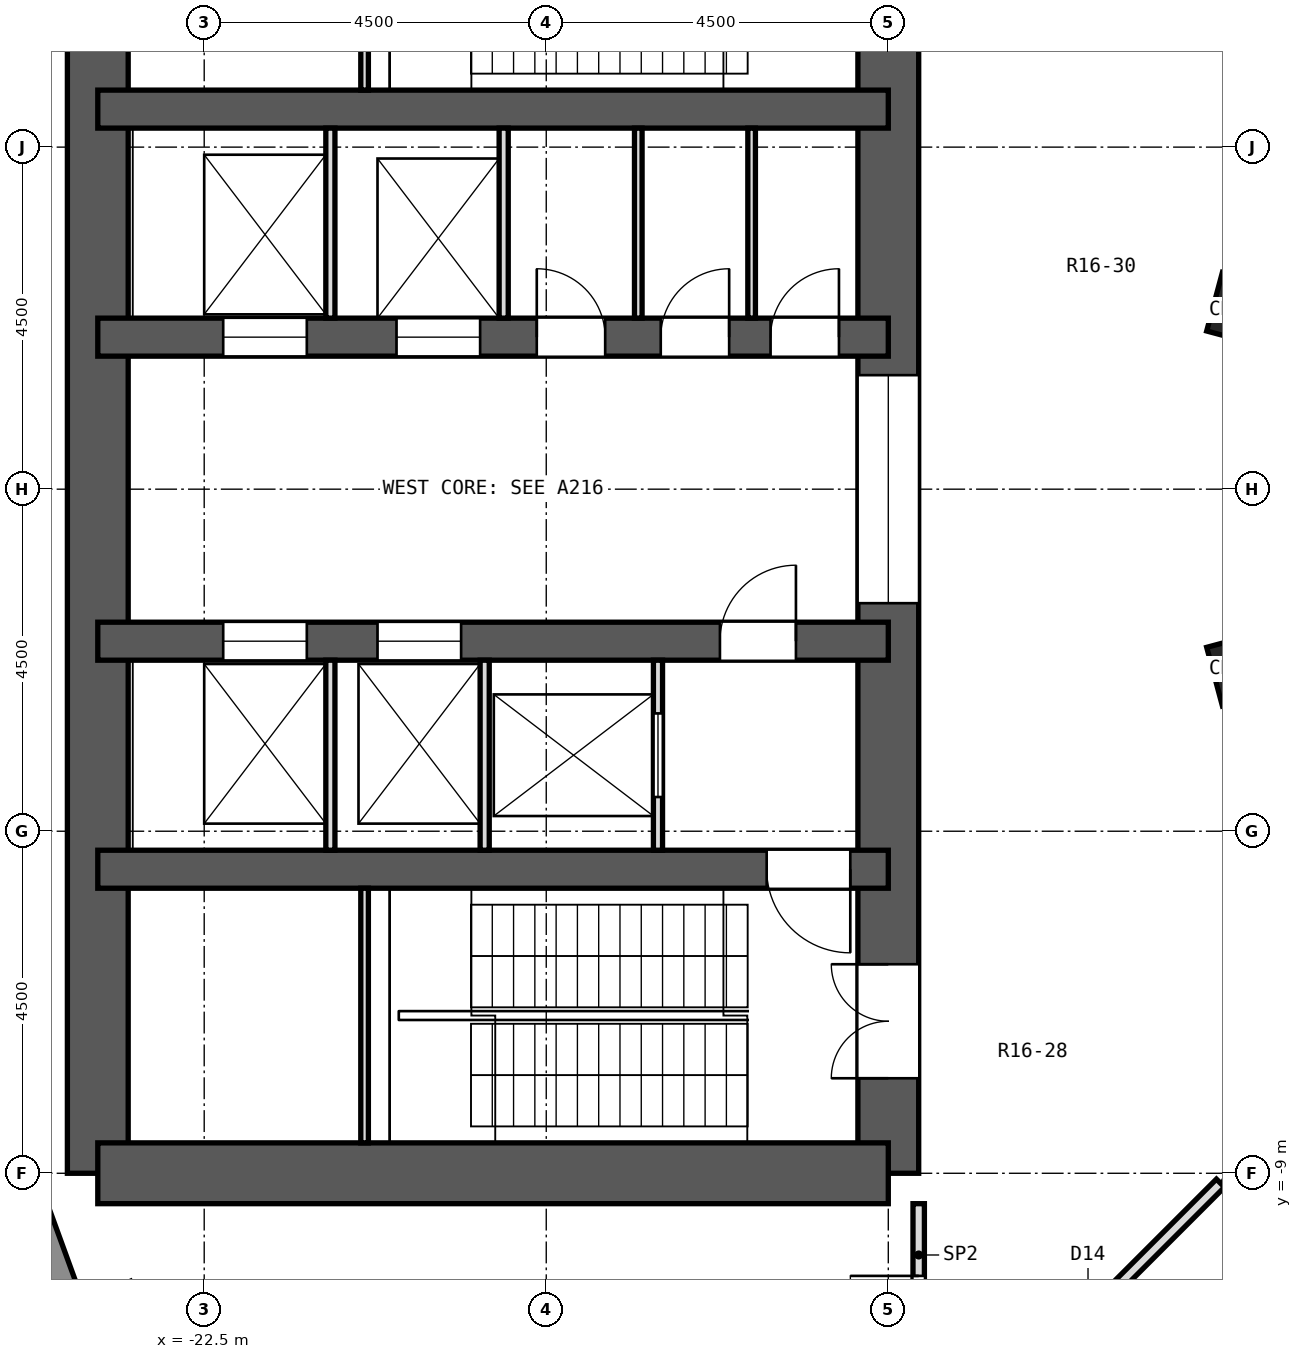
"""IFC4 building model, lengths in metres.
Left out: names, types, materials, properties, quantities, classifications, styles, units other than length and angle.
Written with IfcOpenShell. Run it as: python <this file> out.ifc"""

import sys

from ifc_helpers import new_model, si_unit, direction, frame, frame_2d, origin, origin_2d, place, context, subcontext, project, spatial, rectangle, extrude, element, fill, save


model = new_model("IFC4")
c1 = context("Model", 3, precision=1e-05, world=origin(), true_north=direction((0.0, 1.0)))
c2 = subcontext(c1, "Body", "Model", "MODEL_VIEW")
j1 = project(units=[si_unit("LENGTHUNIT", "METRE"), si_unit("PLANEANGLEUNIT", "RADIAN")], contexts=[c1])
p1 = place(None, origin())
s1 = spatial("IfcSite", under=j1, at=p1, CompositionType="ELEMENT")
p2 = place(p1, origin())
s2 = spatial("IfcBuilding", under=s1, at=p2, CompositionType="ELEMENT")
p3 = place(p2, frame((0.0, 0.0, 86.9)))
s3 = spatial("IfcBuildingStorey", under=s2, at=p3, CompositionType="ELEMENT", Elevation=86.9)
for number, where, z_axis, x_axis in (
    (1, (-8.821, 2.364, 0.0), (0.0, 0.0, 1.0), (-0.966, 0.259, 0.0)),
    (2, (-8.821, -2.364, 0.0), (0.0, 0.0, 1.0), (-0.966, -0.259, 0.0)),
):
    element("IfcColumn", number, at=place(p3, frame(where, z_axis=z_axis, x_axis=x_axis)), inside=s3, PredefinedType="COLUMN", context=c2, shape_type="SweptSolid", body=[
        extrude(rectangle(XDim=0.8, YDim=0.8, at=origin_2d()), origin(), (0.0, 0.0, 1.0), 5.0),
    ])
p4 = place(p3, frame((-13.5, -9.0, 0.0), z_axis=(0.0, 0.0, 1.0), x_axis=(0.0, 1.0, 0.0)))
e3 = element("IfcWall", 3, at=p4, inside=s3, PredefinedType="SHEAR", context=c2, shape_type="SweptSolid", body=[
    extrude(rectangle(XDim=18.0, YDim=0.8, at=frame_2d((9.0, 0.0))), origin(), (0.0, 0.0, 1.0), 5.0),
])
p5 = place(p4, frame((15.25, 0.0, 0.0)))
e4 = element("IfcOpeningElement", 4, at=p5, cuts=e3, PredefinedType="OPENING", context=c2, shape_type="SweptSolid", body=[
    extrude(rectangle(XDim=1.5, YDim=2.1, at=frame_2d((0.75, 1.05))), frame((0.0, 0.412, 0.0), z_axis=(0.0, -1.0, 0.0), x_axis=(1.0, 0.0, 0.0)), (0.0, 0.0, 1.0), 0.824),
])
p6 = place(p4, frame((1.25, 0.0, 0.0)))
e5 = element("IfcOpeningElement", 5, at=p6, cuts=e3, PredefinedType="OPENING", context=c2, shape_type="SweptSolid", body=[
    extrude(rectangle(XDim=1.5, YDim=2.1, at=frame_2d((0.75, 1.05))), frame((0.0, 0.412, 0.0), z_axis=(0.0, -1.0, 0.0), x_axis=(1.0, 0.0, 0.0)), (0.0, 0.0, 1.0), 0.824),
])
p7 = place(p4, frame((7.5, 0.0, 0.0)))
e6 = element("IfcOpeningElement", 6, at=p7, cuts=e3, PredefinedType="OPENING", context=c2, shape_type="SweptSolid", body=[
    extrude(rectangle(XDim=3.0, YDim=2.4, at=frame_2d((1.5, 1.2))), frame((0.0, 0.412, 0.0), z_axis=(0.0, -1.0, 0.0), x_axis=(1.0, 0.0, 0.0)), (0.0, 0.0, 1.0), 0.824),
])
p8 = place(p3, frame((-23.9, -9.0, 0.0), z_axis=(0.0, 0.0, 1.0), x_axis=(0.0, 1.0, 0.0)))
e7 = element("IfcWall", 7, at=p8, inside=s3, PredefinedType="SHEAR", context=c2, shape_type="SweptSolid", body=[
    extrude(rectangle(XDim=18.0, YDim=0.8, at=frame_2d((9.0, 0.0))), origin(), (0.0, 0.0, 1.0), 5.0),
])
p9 = place(p3, frame((-13.5, -9.0, 0.0), z_axis=(0.0, 0.0, 1.0), x_axis=(-1.0, 0.0, 0.0)))
e8 = element("IfcWall", 8, at=p9, inside=s3, PredefinedType="SHEAR", context=c2, shape_type="SweptSolid", body=[
    extrude(rectangle(XDim=10.4, YDim=0.8, at=frame_2d((5.2, 0.0))), origin(), (0.0, 0.0, 1.0), 5.0),
])
p10 = place(p3, frame((-13.5, 5.0, 0.0), z_axis=(0.0, 0.0, 1.0), x_axis=(-1.0, 0.0, 0.0)))
e9 = element("IfcWall", 9, at=p10, inside=s3, PredefinedType="SHEAR", context=c2, shape_type="SweptSolid", body=[
    extrude(rectangle(XDim=10.4, YDim=0.5, at=frame_2d((5.2, 0.0))), origin(), (0.0, 0.0, 1.0), 5.0),
])
p11 = place(p3, frame((-13.5, -5.0, 0.0), z_axis=(0.0, 0.0, 1.0), x_axis=(-1.0, 0.0, 0.0)))
e10 = element("IfcWall", 10, at=p11, inside=s3, PredefinedType="SHEAR", context=c2, shape_type="SweptSolid", body=[
    extrude(rectangle(XDim=10.4, YDim=0.5, at=frame_2d((5.2, 0.0))), origin(), (0.0, 0.0, 1.0), 5.0),
])
p12 = place(p11, frame((0.5, 0.0, 0.0)))
e11 = element("IfcOpeningElement", 11, at=p12, cuts=e10, PredefinedType="OPENING", context=c2, shape_type="SweptSolid", body=[
    extrude(rectangle(XDim=1.1, YDim=2.1, at=frame_2d((0.55, 1.05))), frame((0.0, 0.262, 0.0), z_axis=(0.0, -1.0, 0.0), x_axis=(1.0, 0.0, 0.0)), (0.0, 0.0, 1.0), 0.524),
])
p13 = place(p3, frame((-13.5, 2.0, 0.0), z_axis=(0.0, 0.0, 1.0), x_axis=(-1.0, 0.0, 0.0)))
e12 = element("IfcWall", 12, at=p13, inside=s3, PredefinedType="SHEAR", context=c2, shape_type="SweptSolid", body=[
    extrude(rectangle(XDim=10.4, YDim=0.5, at=frame_2d((5.2, 0.0))), origin(), (0.0, 0.0, 1.0), 5.0),
])
p14 = place(p13, frame((5.37, 0.0, 0.0)))
e13 = element("IfcOpeningElement", 13, at=p14, cuts=e12, PredefinedType="OPENING", context=c2, shape_type="SweptSolid", body=[
    extrude(rectangle(XDim=1.1, YDim=2.1, at=frame_2d((0.55, 1.05))), frame((0.0, 0.262, 0.0), z_axis=(0.0, -1.0, 0.0), x_axis=(1.0, 0.0, 0.0)), (0.0, 0.0, 1.0), 0.524),
])
p15 = place(p13, frame((7.65, 0.0, 0.0)))
e14 = element("IfcOpeningElement", 14, at=p15, cuts=e12, PredefinedType="OPENING", context=c2, shape_type="SweptSolid", body=[
    extrude(rectangle(XDim=1.1, YDim=2.1, at=frame_2d((0.55, 1.05))), frame((0.0, 0.262, 0.0), z_axis=(0.0, -1.0, 0.0), x_axis=(1.0, 0.0, 0.0)), (0.0, 0.0, 1.0), 0.524),
])
p16 = place(p13, frame((0.649, 0.0, 0.0)))
e15 = element("IfcOpeningElement", 15, at=p16, cuts=e12, PredefinedType="OPENING", context=c2, shape_type="SweptSolid", body=[
    extrude(rectangle(XDim=0.9, YDim=2.1, at=frame_2d((0.45, 1.05))), frame((0.0, 0.262, 0.0), z_axis=(0.0, -1.0, 0.0), x_axis=(1.0, 0.0, 0.0)), (0.0, 0.0, 1.0), 0.524),
])
p17 = place(p13, frame((2.094, 0.0, 0.0)))
e16 = element("IfcOpeningElement", 16, at=p17, cuts=e12, PredefinedType="OPENING", context=c2, shape_type="SweptSolid", body=[
    extrude(rectangle(XDim=0.9, YDim=2.1, at=frame_2d((0.45, 1.05))), frame((0.0, 0.262, 0.0), z_axis=(0.0, -1.0, 0.0), x_axis=(1.0, 0.0, 0.0)), (0.0, 0.0, 1.0), 0.524),
])
p18 = place(p13, frame((3.725, 0.0, 0.0)))
e17 = element("IfcOpeningElement", 17, at=p18, cuts=e12, PredefinedType="OPENING", context=c2, shape_type="SweptSolid", body=[
    extrude(rectangle(XDim=0.9, YDim=2.1, at=frame_2d((0.45, 1.05))), frame((0.0, 0.262, 0.0), z_axis=(0.0, -1.0, 0.0), x_axis=(1.0, 0.0, 0.0)), (0.0, 0.0, 1.0), 0.524),
])
p19 = place(p3, frame((-13.5, -2.0, 0.0), z_axis=(0.0, 0.0, 1.0), x_axis=(-1.0, 0.0, 0.0)))
e18 = element("IfcWall", 18, at=p19, inside=s3, PredefinedType="SHEAR", context=c2, shape_type="SweptSolid", body=[
    extrude(rectangle(XDim=10.4, YDim=0.5, at=frame_2d((5.2, 0.0))), origin(), (0.0, 0.0, 1.0), 5.0),
])
p20 = place(p19, frame((5.62, 0.0, 0.0)))
e19 = element("IfcOpeningElement", 19, at=p20, cuts=e18, PredefinedType="OPENING", context=c2, shape_type="SweptSolid", body=[
    extrude(rectangle(XDim=1.1, YDim=2.1, at=frame_2d((0.55, 1.05))), frame((0.0, 0.262, 0.0), z_axis=(0.0, -1.0, 0.0), x_axis=(1.0, 0.0, 0.0)), (0.0, 0.0, 1.0), 0.524),
])
p21 = place(p19, frame((7.65, 0.0, 0.0)))
e20 = element("IfcOpeningElement", 20, at=p21, cuts=e18, PredefinedType="OPENING", context=c2, shape_type="SweptSolid", body=[
    extrude(rectangle(XDim=1.1, YDim=2.1, at=frame_2d((0.55, 1.05))), frame((0.0, 0.262, 0.0), z_axis=(0.0, -1.0, 0.0), x_axis=(1.0, 0.0, 0.0)), (0.0, 0.0, 1.0), 0.524),
])
p22 = place(p19, frame((1.215, 0.0, 0.0)))
e21 = element("IfcOpeningElement", 21, at=p22, cuts=e18, PredefinedType="OPENING", context=c2, shape_type="SweptSolid", body=[
    extrude(rectangle(XDim=1.0, YDim=2.1, at=frame_2d((0.5, 1.05))), frame((0.0, 0.262, 0.0), z_axis=(0.0, -1.0, 0.0), x_axis=(1.0, 0.0, 0.0)), (0.0, 0.0, 1.0), 0.524),
])
p23 = place(p3, frame((-25.617, -7.383, 0.0), z_axis=(0.0, 0.0, 1.0), x_axis=(0.341990236633, -0.939703505393, 0.0)))
e22 = element("IfcWall", 22, at=p23, inside=s3, PredefinedType="SOLIDWALL", context=c2, shape_type="SweptSolid", body=[
    extrude(rectangle(XDim=3.648, YDim=0.6, at=frame_2d((1.824, 0.0))), origin(), (0.0, 0.0, 1.0), 4.5),
])
p24 = place(p3, frame((-9.077, -9.077, 0.0), z_axis=(0.0, 0.0, 1.0), x_axis=(0.865961614908, -0.500110469302, 0.0)))
e23 = element("IfcWall", 23, at=p24, inside=s3, PredefinedType="PARTITIONING", context=c2, shape_type="SweptSolid", body=[
    extrude(rectangle(XDim=6.645, YDim=0.15, at=frame_2d((3.322, 0.0))), origin(), (0.0, 0.0, 1.0), 4.5),
])
p25 = place(p24, frame((2.422, 0.0, 0.0)))
e24 = element("IfcOpeningElement", 24, at=p25, cuts=e23, PredefinedType="OPENING", context=c2, shape_type="SweptSolid", body=[
    extrude(rectangle(XDim=1.8, YDim=2.1, at=frame_2d((0.9, 1.05))), frame((0.0, 0.087, 0.0), z_axis=(0.0, -1.0, 0.0), x_axis=(1.0, 0.0, 0.0)), (0.0, 0.0, 1.0), 0.174),
])
p26 = place(p24, frame((5.184, 0.0, 0.0)))
e25 = element("IfcOpeningElement", 25, at=p26, cuts=e23, PredefinedType="OPENING", context=c2, shape_type="SweptSolid", body=[
    extrude(rectangle(XDim=0.9, YDim=2.1, at=frame_2d((0.45, 1.05))), frame((0.0, 0.087, 0.0), z_axis=(0.0, -1.0, 0.0), x_axis=(1.0, 0.0, 0.0)), (0.0, 0.0, 1.0), 0.174),
])
p27 = place(p3, frame((-13.065, -13.065, 0.0), z_axis=(0.0, 0.0, 1.0), x_axis=(0.707106781187, 0.707106781187, 0.0)))
e26 = element("IfcWall", 26, at=p27, inside=s3, PredefinedType="PARTITIONING", context=c2, shape_type="SweptSolid", body=[
    extrude(rectangle(XDim=5.565, YDim=0.15, at=frame_2d((2.782, 0.0))), origin(), (0.0, 0.0, 1.0), 4.5),
])
p28 = place(p27, frame((2.65, 0.0, 0.0)))
e27 = element("IfcOpeningElement", 27, at=p28, cuts=e26, PredefinedType="OPENING", context=c2, shape_type="SweptSolid", body=[
    extrude(rectangle(XDim=0.9, YDim=2.1, at=frame_2d((0.45, 1.05))), frame((0.0, 0.087, 0.0), z_axis=(0.0, -1.0, 0.0), x_axis=(1.0, 0.0, 0.0)), (0.0, 0.0, 1.0), 0.174),
])
p29 = place(p3, frame((-10.024, -14.763, 0.0), z_axis=(0.0, 0.0, 1.0), x_axis=(0.499864084004, 0.866103860702, 0.0)))
e28 = element("IfcWall", 28, at=p29, inside=s3, PredefinedType="PARTITIONING", context=c2, shape_type="SweptSolid", body=[
    extrude(rectangle(XDim=5.322, YDim=0.1, at=frame_2d((2.661, 0.0))), origin(), (0.0, 0.0, 1.0), 4.5),
])
p30 = place(p3, frame((-13.1, -13.025, 0.0), z_axis=(0.0, 0.0, 1.0), x_axis=(0.0, 1.0, 0.0)))
e29 = element("IfcWall", 29, at=p30, inside=s3, PredefinedType="PARTITIONING", context=c2, shape_type="SweptSolid", body=[
    extrude(rectangle(XDim=3.625, YDim=0.15, at=frame_2d((1.812, 0.0))), origin(), (0.0, 0.0, 1.0), 4.5),
])
p31 = place(p30, frame((0.875, 0.0, 0.0)))
e30 = element("IfcOpeningElement", 30, at=p31, cuts=e29, PredefinedType="OPENING", context=c2, shape_type="SweptSolid", body=[
    extrude(rectangle(XDim=1.8, YDim=2.1, at=frame_2d((0.9, 1.05))), frame((0.0, 0.087, 0.0), z_axis=(0.0, -1.0, 0.0), x_axis=(1.0, 0.0, 0.0)), (0.0, 0.0, 1.0), 0.174),
])
for number, where, z_axis, x_axis in (
    (31, (-15.298, 2.25, 0.0), (0.0, 0.0, 1.0), (0.0, 1.0, 0.0)),
    (32, (-16.789, 2.25, 0.0), (0.0, 0.0, 1.0), (0.0, 1.0, 0.0)),
):
    element("IfcWall", number, at=place(p3, frame(where, z_axis=z_axis, x_axis=x_axis)), inside=s3, PredefinedType="PARTITIONING", context=c2, shape_type="SweptSolid", body=[
        extrude(rectangle(XDim=2.5, YDim=0.1, at=frame_2d((1.25, 0.0))), origin(), (0.0, 0.0, 1.0), 4.5),
    ])
for number, where, z_axis, x_axis in (
    (33, (-18.56, 2.25, 0.0), (0.0, 0.0, 1.0), (0.0, 1.0, 0.0)),
    (34, (-20.84, 2.25, 0.0), (0.0, 0.0, 1.0), (0.0, 1.0, 0.0)),
):
    element("IfcWall", number, at=place(p3, frame(where, z_axis=z_axis, x_axis=x_axis)), inside=s3, PredefinedType="PARTITIONING", context=c2, shape_type="SweptSolid", body=[
        extrude(rectangle(XDim=2.5, YDim=0.12, at=frame_2d((1.25, 0.0))), origin(), (0.0, 0.0, 1.0), 4.5),
    ])
p32 = place(p3, frame((-16.53, -4.75, 0.0), z_axis=(0.0, 0.0, 1.0), x_axis=(0.0, 1.0, 0.0)))
e35 = element("IfcWall", 35, at=p32, inside=s3, PredefinedType="PARTITIONING", context=c2, shape_type="SweptSolid", body=[
    extrude(rectangle(XDim=2.5, YDim=0.12, at=frame_2d((1.25, 0.0))), origin(), (0.0, 0.0, 1.0), 4.5),
])
p33 = place(p32, frame((0.7, 0.0, 0.0)))
e36 = element("IfcOpeningElement", 36, at=p33, cuts=e35, PredefinedType="OPENING", context=c2, shape_type="SweptSolid", body=[
    extrude(rectangle(XDim=1.1, YDim=2.1, at=frame_2d((0.55, 1.05))), frame((0.0, 0.072, 0.0), z_axis=(0.0, -1.0, 0.0), x_axis=(1.0, 0.0, 0.0)), (0.0, 0.0, 1.0), 0.144),
])
for number, where, z_axis, x_axis in (
    (37, (-18.81, -4.75, 0.0), (0.0, 0.0, 1.0), (0.0, 1.0, 0.0)),
    (38, (-20.84, -4.75, 0.0), (0.0, 0.0, 1.0), (0.0, 1.0, 0.0)),
):
    element("IfcWall", number, at=place(p3, frame(where, z_axis=z_axis, x_axis=x_axis)), inside=s3, PredefinedType="PARTITIONING", context=c2, shape_type="SweptSolid", body=[
        extrude(rectangle(XDim=2.5, YDim=0.12, at=frame_2d((1.25, 0.0))), origin(), (0.0, 0.0, 1.0), 4.5),
    ])
for number, where, z_axis, x_axis in (
    (39, (-20.39, 5.25, 0.0), (0.0, 0.0, 1.0), (0.0, 1.0, 0.0)),
    (40, (-20.39, -8.6, 0.0), (0.0, 0.0, 1.0), (0.0, 1.0, 0.0)),
):
    element("IfcWall", number, at=place(p3, frame(where, z_axis=z_axis, x_axis=x_axis)), inside=s3, PredefinedType="PARTITIONING", context=c2, shape_type="SweptSolid", body=[
        extrude(rectangle(XDim=3.35, YDim=0.1, at=frame_2d((1.675, 0.0))), origin(), (0.0, 0.0, 1.0), 4.5),
    ])
p34 = place(p31, origin())
e41 = element("IfcDoor", 41, at=p34, inside=s3, OperationType="DOUBLE_DOOR_SINGLE_SWING", PredefinedType="DOOR", context=c2, shape_type="SweptSolid", body=[
    extrude(rectangle(XDim=1.8, YDim=2.1, at=frame_2d((0.9, 1.05))), frame((0.0, 0.025, 0.0), z_axis=(0.0, -1.0, 0.0), x_axis=(1.0, 0.0, 0.0)), (0.0, 0.0, 1.0), 0.05),
])
fill(e30, e41)
p35 = place(p14, origin())
e42 = element("IfcDoor", 42, at=p35, inside=s3, OperationType="DOUBLE_DOOR_SLIDING", PredefinedType="DOOR", context=c2, shape_type="SweptSolid", body=[
    extrude(rectangle(XDim=1.1, YDim=2.1, at=frame_2d((0.55, 1.05))), frame((0.0, 0.025, 0.0), z_axis=(0.0, -1.0, 0.0), x_axis=(1.0, 0.0, 0.0)), (0.0, 0.0, 1.0), 0.05),
])
fill(e13, e42)
p36 = place(p15, origin())
e43 = element("IfcDoor", 43, at=p36, inside=s3, OperationType="DOUBLE_DOOR_SLIDING", PredefinedType="DOOR", context=c2, shape_type="SweptSolid", body=[
    extrude(rectangle(XDim=1.1, YDim=2.1, at=frame_2d((0.55, 1.05))), frame((0.0, 0.025, 0.0), z_axis=(0.0, -1.0, 0.0), x_axis=(1.0, 0.0, 0.0)), (0.0, 0.0, 1.0), 0.05),
])
fill(e14, e43)
p37 = place(p33, origin())
e44 = element("IfcDoor", 44, at=p37, inside=s3, OperationType="DOUBLE_DOOR_SLIDING", PredefinedType="DOOR", context=c2, shape_type="SweptSolid", body=[
    extrude(rectangle(XDim=1.1, YDim=2.1, at=frame_2d((0.55, 1.05))), frame((0.0, 0.025, 0.0), z_axis=(0.0, -1.0, 0.0), x_axis=(1.0, 0.0, 0.0)), (0.0, 0.0, 1.0), 0.05),
])
fill(e36, e44)
p38 = place(p20, origin())
e45 = element("IfcDoor", 45, at=p38, inside=s3, OperationType="DOUBLE_DOOR_SLIDING", PredefinedType="DOOR", context=c2, shape_type="SweptSolid", body=[
    extrude(rectangle(XDim=1.1, YDim=2.1, at=frame_2d((0.55, 1.05))), frame((0.0, 0.025, 0.0), z_axis=(0.0, -1.0, 0.0), x_axis=(1.0, 0.0, 0.0)), (0.0, 0.0, 1.0), 0.05),
])
fill(e19, e45)
p39 = place(p21, origin())
e46 = element("IfcDoor", 46, at=p39, inside=s3, OperationType="DOUBLE_DOOR_SLIDING", PredefinedType="DOOR", context=c2, shape_type="SweptSolid", body=[
    extrude(rectangle(XDim=1.1, YDim=2.1, at=frame_2d((0.55, 1.05))), frame((0.0, 0.025, 0.0), z_axis=(0.0, -1.0, 0.0), x_axis=(1.0, 0.0, 0.0)), (0.0, 0.0, 1.0), 0.05),
])
fill(e20, e46)
p40 = place(p16, frame((0.9, 0.0, 0.0), z_axis=(0.0, 0.0, 1.0), x_axis=(-1.0, 0.0, 0.0)))
e47 = element("IfcDoor", 47, at=p40, inside=s3, OperationType="SINGLE_SWING_RIGHT", PredefinedType="DOOR", context=c2, shape_type="SweptSolid", body=[
    extrude(rectangle(XDim=0.9, YDim=2.1, at=frame_2d((0.45, 1.05))), frame((0.0, 0.025, 0.0), z_axis=(0.0, -1.0, 0.0), x_axis=(1.0, 0.0, 0.0)), (0.0, 0.0, 1.0), 0.05),
])
fill(e15, e47)
p41 = place(p17, frame((0.9, 0.0, 0.0), z_axis=(0.0, 0.0, 1.0), x_axis=(-1.0, 0.0, 0.0)))
e48 = element("IfcDoor", 48, at=p41, inside=s3, OperationType="SINGLE_SWING_RIGHT", PredefinedType="DOOR", context=c2, shape_type="SweptSolid", body=[
    extrude(rectangle(XDim=0.9, YDim=2.1, at=frame_2d((0.45, 1.05))), frame((0.0, 0.025, 0.0), z_axis=(0.0, -1.0, 0.0), x_axis=(1.0, 0.0, 0.0)), (0.0, 0.0, 1.0), 0.05),
])
fill(e16, e48)
p42 = place(p18, frame((0.9, 0.0, 0.0), z_axis=(0.0, 0.0, 1.0), x_axis=(-1.0, 0.0, 0.0)))
e49 = element("IfcDoor", 49, at=p42, inside=s3, OperationType="SINGLE_SWING_LEFT", PredefinedType="DOOR", context=c2, shape_type="SweptSolid", body=[
    extrude(rectangle(XDim=0.9, YDim=2.1, at=frame_2d((0.45, 1.05))), frame((0.0, 0.025, 0.0), z_axis=(0.0, -1.0, 0.0), x_axis=(1.0, 0.0, 0.0)), (0.0, 0.0, 1.0), 0.05),
])
fill(e17, e49)
p43 = place(p22, frame((1.0, 0.0, 0.0), z_axis=(0.0, 0.0, 1.0), x_axis=(-1.0, 0.0, 0.0)))
e50 = element("IfcDoor", 50, at=p43, inside=s3, OperationType="SINGLE_SWING_RIGHT", PredefinedType="DOOR", context=c2, shape_type="SweptSolid", body=[
    extrude(rectangle(XDim=1.0, YDim=2.1, at=frame_2d((0.5, 1.05))), frame((0.0, 0.025, 0.0), z_axis=(0.0, -1.0, 0.0), x_axis=(1.0, 0.0, 0.0)), (0.0, 0.0, 1.0), 0.05),
])
fill(e21, e50)
p44 = place(p12, origin())
e51 = element("IfcDoor", 51, at=p44, inside=s3, OperationType="SINGLE_SWING_LEFT", PredefinedType="DOOR", context=c2, shape_type="SweptSolid", body=[
    extrude(rectangle(XDim=1.1, YDim=2.1, at=frame_2d((0.55, 1.05))), frame((0.0, 0.025, 0.0), z_axis=(0.0, -1.0, 0.0), x_axis=(1.0, 0.0, 0.0)), (0.0, 0.0, 1.0), 0.05),
])
fill(e11, e51)
p45 = place(p6, origin())
e52 = element("IfcDoor", 52, at=p45, inside=s3, OperationType="DOUBLE_DOOR_SINGLE_SWING", PredefinedType="DOOR", context=c2, shape_type="SweptSolid", body=[
    extrude(rectangle(XDim=1.5, YDim=2.1, at=frame_2d((0.75, 1.05))), frame((0.0, 0.025, 0.0), z_axis=(0.0, -1.0, 0.0), x_axis=(1.0, 0.0, 0.0)), (0.0, 0.0, 1.0), 0.05),
])
fill(e5, e52)
p46 = place(p7, origin())
e53 = element("IfcDoor", 53, at=p46, inside=s3, OperationType="DOUBLE_DOOR_SLIDING", PredefinedType="DOOR", context=c2, shape_type="SweptSolid", body=[
    extrude(rectangle(XDim=3.0, YDim=2.4, at=frame_2d((1.5, 1.2))), frame((0.0, 0.025, 0.0), z_axis=(0.0, -1.0, 0.0), x_axis=(1.0, 0.0, 0.0)), (0.0, 0.0, 1.0), 0.05),
])
fill(e6, e53)
save(model, sys.argv[1])
